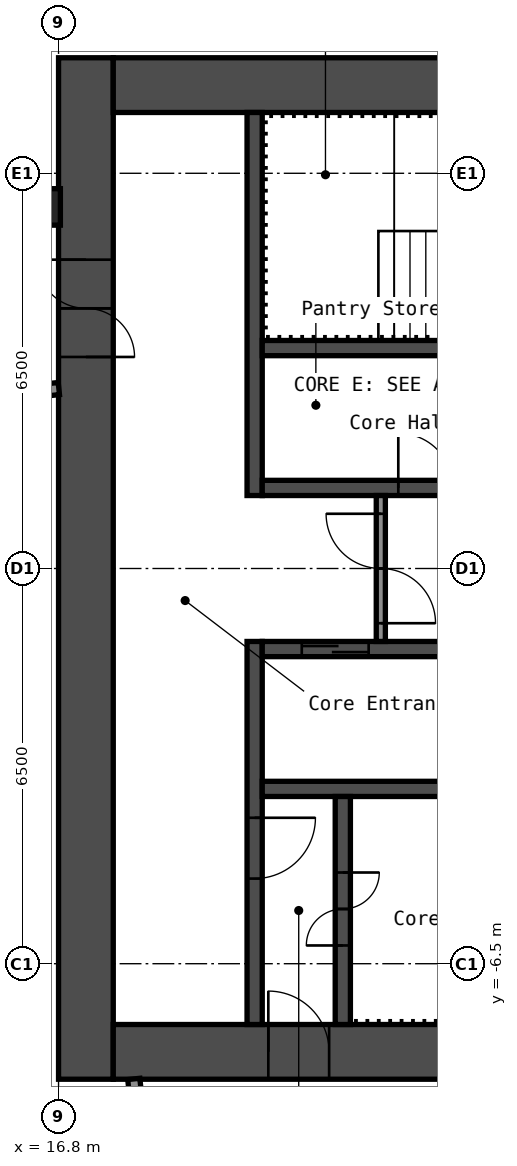
"""IFC4 building model, lengths in metres.
Left out: names, types, materials, properties, quantities, classifications, styles, units other than length and angle.
Written with IfcOpenShell. Run it as: python <this file> out.ifc"""

import sys

from ifc_helpers import new_model, si_unit, direction, frame, frame_2d, origin, origin_2d, place, context, subcontext, project, spatial, rectangle, hollow_rectangle, extrude, element, fill, save


model = new_model("IFC4")
c1 = context("Model", 3, precision=1e-05, world=origin(), true_north=direction((0.0, 1.0)))
c2 = subcontext(c1, "Body", "Model", "MODEL_VIEW")
j1 = project(units=[si_unit("LENGTHUNIT", "METRE"), si_unit("PLANEANGLEUNIT", "RADIAN")], contexts=[c1])
p1 = place(None, origin())
s1 = spatial("IfcSite", under=j1, at=p1, CompositionType="ELEMENT")
p2 = place(p1, origin())
s2 = spatial("IfcBuilding", under=s1, at=p2, CompositionType="ELEMENT")
p3 = place(p2, frame((0.0, 0.0, 261.4)))
s3 = spatial("IfcBuildingStorey", under=s2, at=p3, CompositionType="ELEMENT", Elevation=261.4)
p4 = place(p3, frame((16.53, 5.947, 0.0), z_axis=(0.0, 0.0, 1.0), x_axis=(1.0, 0.0, 0.0)))
e1 = element("IfcColumn", 1, at=p4, inside=s3, PredefinedType="COLUMN", context=c2, shape_type="SweptSolid", body=[
    extrude(hollow_rectangle(XDim=0.6, YDim=0.6, WallThickness=0.025, InnerFilletRadius=0.038, OuterFilletRadius=0.062, at=origin_2d()), origin(), (0.0, 0.0, 1.0), 2.75),
])
p5 = place(p3, frame((17.25, -8.4, 0.0), z_axis=(0.0, 0.0, 1.0), x_axis=(0.0, 1.0, 0.0)))
e2 = element("IfcWall", 2, at=p5, inside=s3, PredefinedType="SHEAR", context=c2, shape_type="SweptSolid", body=[
    extrude(rectangle(XDim=16.8, YDim=0.9, at=frame_2d((8.4, 0.0))), origin(), (0.0, 0.0, 1.0), 2.75),
])
p6 = place(p5, frame((11.879, 0.0, 0.0)))
e3 = element("IfcOpeningElement", 3, at=p6, cuts=e2, PredefinedType="OPENING", context=c2, shape_type="SweptSolid", body=[
    extrude(rectangle(XDim=1.6, YDim=2.1, at=frame_2d((0.8, 1.05))), frame((0.0, 0.46, 0.0), z_axis=(0.0, -1.0, 0.0), x_axis=(1.0, 0.0, 0.0)), (0.0, 0.0, 1.0), 0.92),
])
p7 = place(p3, frame((17.7, 7.95, 0.0), z_axis=(0.0, 0.0, 1.0), x_axis=(1.0, 0.0, 0.0)))
e4 = element("IfcWall", 4, at=p7, inside=s3, PredefinedType="SHEAR", context=c2, shape_type="SweptSolid", body=[
    extrude(rectangle(XDim=15.0, YDim=0.9, at=frame_2d((7.5, 0.0))), origin(), (0.0, 0.0, 1.0), 2.75),
])
p8 = place(p7, frame((10.4, 0.0, 0.0)))
e5 = element("IfcOpeningElement", 5, at=p8, cuts=e4, PredefinedType="OPENING", context=c2, shape_type="SweptSolid", body=[
    extrude(rectangle(XDim=1.2, YDim=2.1, at=frame_2d((0.6, 1.05))), frame((0.0, 0.46, 0.0), z_axis=(0.0, -1.0, 0.0), x_axis=(1.0, 0.0, 0.0)), (0.0, 0.0, 1.0), 0.92),
])
p9 = place(p7, frame((13.35, 0.0, 0.0)))
e6 = element("IfcOpeningElement", 6, at=p9, cuts=e4, PredefinedType="OPENING", context=c2, shape_type="SweptSolid", body=[
    extrude(rectangle(XDim=0.9, YDim=2.1, at=frame_2d((0.45, 1.05))), frame((0.0, 0.46, 0.0), z_axis=(0.0, -1.0, 0.0), x_axis=(1.0, 0.0, 0.0)), (0.0, 0.0, 1.0), 0.92),
])
p10 = place(p3, frame((17.7, -7.95, 0.0), z_axis=(0.0, 0.0, 1.0), x_axis=(1.0, 0.0, 0.0)))
e7 = element("IfcWall", 7, at=p10, inside=s3, PredefinedType="SHEAR", context=c2, shape_type="SweptSolid", body=[
    extrude(rectangle(XDim=15.0, YDim=0.9, at=frame_2d((7.5, 0.0))), origin(), (0.0, 0.0, 1.0), 2.75),
])
p11 = place(p10, frame((2.55, 0.0, 0.0)))
e8 = element("IfcOpeningElement", 8, at=p11, cuts=e7, PredefinedType="OPENING", context=c2, shape_type="SweptSolid", body=[
    extrude(rectangle(XDim=1.0, YDim=2.1, at=frame_2d((0.5, 1.05))), frame((0.0, 0.46, 0.0), z_axis=(0.0, -1.0, 0.0), x_axis=(1.0, 0.0, 0.0)), (0.0, 0.0, 1.0), 0.92),
])
p12 = place(p3, frame((20.025, 1.2, 0.0), z_axis=(0.0, 0.0, 1.0), x_axis=(0.0, 1.0, 0.0)))
e9 = element("IfcWall", 9, at=p12, inside=s3, PredefinedType="SHEAR", context=c2, shape_type="SweptSolid", body=[
    extrude(rectangle(XDim=6.3, YDim=0.25, at=frame_2d((3.15, 0.0))), origin(), (0.0, 0.0, 1.0), 2.75),
])
p13 = place(p3, frame((20.025, -7.5, 0.0), z_axis=(0.0, 0.0, 1.0), x_axis=(0.0, 1.0, 0.0)))
e10 = element("IfcWall", 10, at=p13, inside=s3, PredefinedType="SHEAR", context=c2, shape_type="SweptSolid", body=[
    extrude(rectangle(XDim=6.3, YDim=0.25, at=frame_2d((3.15, 0.0))), origin(), (0.0, 0.0, 1.0), 2.75),
])
p14 = place(p13, frame((2.4, 0.0, 0.0)))
e11 = element("IfcOpeningElement", 11, at=p14, cuts=e10, PredefinedType="OPENING", context=c2, shape_type="SweptSolid", body=[
    extrude(rectangle(XDim=1.0, YDim=2.1, at=frame_2d((0.5, 1.05))), frame((0.0, 0.135, 0.0), z_axis=(0.0, -1.0, 0.0), x_axis=(1.0, 0.0, 0.0)), (0.0, 0.0, 1.0), 0.27),
])
p15 = place(p3, frame((20.15, 1.325, 0.0), z_axis=(0.0, 0.0, 1.0), x_axis=(1.0, 0.0, 0.0)))
e12 = element("IfcWall", 12, at=p15, inside=s3, PredefinedType="SHEAR", context=c2, shape_type="SweptSolid", body=[
    extrude(rectangle(XDim=7.5, YDim=0.25, at=frame_2d((3.75, 0.0))), origin(), (0.0, 0.0, 1.0), 2.75),
])
p16 = place(p15, frame((2.238, 0.0, 0.0)))
e13 = element("IfcOpeningElement", 13, at=p16, cuts=e12, PredefinedType="OPENING", context=c2, shape_type="SweptSolid", body=[
    extrude(rectangle(XDim=0.9, YDim=2.1, at=frame_2d((0.45, 1.05))), frame((0.0, 0.135, 0.0), z_axis=(0.0, -1.0, 0.0), x_axis=(1.0, 0.0, 0.0)), (0.0, 0.0, 1.0), 0.27),
])
p17 = place(p15, frame((5.938, 0.0, 0.0)))
e14 = element("IfcOpeningElement", 14, at=p17, cuts=e12, PredefinedType="OPENING", context=c2, shape_type="SweptSolid", body=[
    extrude(rectangle(XDim=0.9, YDim=2.1, at=frame_2d((0.45, 1.05))), frame((0.0, 0.135, 0.0), z_axis=(0.0, -1.0, 0.0), x_axis=(1.0, 0.0, 0.0)), (0.0, 0.0, 1.0), 0.27),
])
p18 = place(p3, frame((20.15, 3.625, 0.0), z_axis=(0.0, 0.0, 1.0), x_axis=(1.0, 0.0, 0.0)))
e15 = element("IfcWall", 15, at=p18, inside=s3, PredefinedType="SHEAR", context=c2, shape_type="SweptSolid", body=[
    extrude(rectangle(XDim=7.5, YDim=0.25, at=frame_2d((3.75, 0.0))), origin(), (0.0, 0.0, 1.0), 2.75),
])
p19 = place(p3, frame((20.15, -1.325, 0.0), z_axis=(0.0, 0.0, 1.0), x_axis=(1.0, 0.0, 0.0)))
e16 = element("IfcWall", 16, at=p19, inside=s3, PredefinedType="SHEAR", context=c2, shape_type="SweptSolid", body=[
    extrude(rectangle(XDim=7.5, YDim=0.25, at=frame_2d((3.75, 0.0))), origin(), (0.0, 0.0, 1.0), 2.75),
])
p20 = place(p19, frame((0.65, 0.0, 0.0)))
e17 = element("IfcOpeningElement", 17, at=p20, cuts=e16, PredefinedType="OPENING", context=c2, shape_type="SweptSolid", body=[
    extrude(rectangle(XDim=1.1, YDim=2.1, at=frame_2d((0.55, 1.05))), frame((0.0, 0.135, 0.0), z_axis=(0.0, -1.0, 0.0), x_axis=(1.0, 0.0, 0.0)), (0.0, 0.0, 1.0), 0.27),
])
p21 = place(p19, frame((3.05, 0.0, 0.0)))
e18 = element("IfcOpeningElement", 18, at=p21, cuts=e16, PredefinedType="OPENING", context=c2, shape_type="SweptSolid", body=[
    extrude(rectangle(XDim=1.1, YDim=2.1, at=frame_2d((0.55, 1.05))), frame((0.0, 0.135, 0.0), z_axis=(0.0, -1.0, 0.0), x_axis=(1.0, 0.0, 0.0)), (0.0, 0.0, 1.0), 0.27),
])
p22 = place(p19, frame((5.45, 0.0, 0.0)))
e19 = element("IfcOpeningElement", 19, at=p22, cuts=e16, PredefinedType="OPENING", context=c2, shape_type="SweptSolid", body=[
    extrude(rectangle(XDim=1.1, YDim=2.1, at=frame_2d((0.55, 1.05))), frame((0.0, 0.135, 0.0), z_axis=(0.0, -1.0, 0.0), x_axis=(1.0, 0.0, 0.0)), (0.0, 0.0, 1.0), 0.27),
])
p23 = place(p3, frame((20.15, -3.625, 0.0), z_axis=(0.0, 0.0, 1.0), x_axis=(1.0, 0.0, 0.0)))
e20 = element("IfcWall", 20, at=p23, inside=s3, PredefinedType="SHEAR", context=c2, shape_type="SweptSolid", body=[
    extrude(rectangle(XDim=7.5, YDim=0.25, at=frame_2d((3.75, 0.0))), origin(), (0.0, 0.0, 1.0), 2.75),
])
p24 = place(p3, frame((21.475, -7.5, 0.0), z_axis=(0.0, 0.0, 1.0), x_axis=(0.0, 1.0, 0.0)))
e21 = element("IfcWall", 21, at=p24, inside=s3, PredefinedType="SHEAR", context=c2, shape_type="SweptSolid", body=[
    extrude(rectangle(XDim=3.75, YDim=0.25, at=frame_2d((1.875, 0.0))), origin(), (0.0, 0.0, 1.0), 2.75),
])
p25 = place(p24, frame((1.3, 0.0, 0.0)))
e22 = element("IfcOpeningElement", 22, at=p25, cuts=e21, PredefinedType="OPENING", context=c2, shape_type="SweptSolid", body=[
    extrude(rectangle(XDim=1.2, YDim=2.1, at=frame_2d((0.6, 1.05))), frame((0.0, 0.135, 0.0), z_axis=(0.0, -1.0, 0.0), x_axis=(1.0, 0.0, 0.0)), (0.0, 0.0, 1.0), 0.27),
])
p26 = place(p3, frame((22.1, -1.2, 0.0), z_axis=(0.0, 0.0, 1.0), x_axis=(0.0, 1.0, 0.0)))
e23 = element("IfcWall", 23, at=p26, inside=s3, PredefinedType="PARTITIONING", context=c2, shape_type="SweptSolid", body=[
    extrude(rectangle(XDim=2.4, YDim=0.15, at=frame_2d((1.2, 0.0))), origin(), (0.0, 0.0, 1.0), 2.75),
])
p27 = place(p26, frame((0.3, 0.0, 0.0)))
e24 = element("IfcOpeningElement", 24, at=p27, cuts=e23, PredefinedType="OPENING", context=c2, shape_type="SweptSolid", body=[
    extrude(rectangle(XDim=1.8, YDim=2.1, at=frame_2d((0.9, 1.05))), frame((0.0, 0.085, 0.0), z_axis=(0.0, -1.0, 0.0), x_axis=(1.0, 0.0, 0.0)), (0.0, 0.0, 1.0), 0.17),
])
p28 = place(p3, frame((-16.572, -0.549, 0.0), z_axis=(0.0, 0.0, 1.0), x_axis=(0.994521146831, 0.104535584879, 0.0)))
e25 = element("IfcWall", 25, at=p28, inside=s3, PredefinedType="PARTITIONING", context=c2, shape_type="SweptSolid", body=[
    extrude(rectangle(XDim=33.561, YDim=0.2, at=frame_2d((16.78, 0.0))), origin(), (0.0, 0.0, 1.0), 2.75),
])
p29 = place(p28, frame((1.315, 0.0, 0.0)))
e26 = element("IfcOpeningElement", 26, at=p29, cuts=e25, PredefinedType="OPENING", context=c2, shape_type="SweptSolid", body=[
    extrude(rectangle(XDim=0.9, YDim=2.1, at=frame_2d((0.45, 1.05))), frame((0.0, 0.11, 0.0), z_axis=(0.0, -1.0, 0.0), x_axis=(1.0, 0.0, 0.0)), (0.0, 0.0, 1.0), 0.22),
])
p30 = place(p28, frame((5.515, 0.0, 0.0)))
e27 = element("IfcOpeningElement", 27, at=p30, cuts=e25, PredefinedType="OPENING", context=c2, shape_type="SweptSolid", body=[
    extrude(rectangle(XDim=0.9, YDim=2.1, at=frame_2d((0.45, 1.05))), frame((0.0, 0.11, 0.0), z_axis=(0.0, -1.0, 0.0), x_axis=(1.0, 0.0, 0.0)), (0.0, 0.0, 1.0), 0.22),
])
p31 = place(p28, frame((10.555, 0.0, 0.0)))
e28 = element("IfcOpeningElement", 28, at=p31, cuts=e25, PredefinedType="OPENING", context=c2, shape_type="SweptSolid", body=[
    extrude(rectangle(XDim=0.9, YDim=2.1, at=frame_2d((0.45, 1.05))), frame((0.0, 0.11, 0.0), z_axis=(0.0, -1.0, 0.0), x_axis=(1.0, 0.0, 0.0)), (0.0, 0.0, 1.0), 0.22),
])
p32 = place(p28, frame((14.755, 0.0, 0.0)))
e29 = element("IfcOpeningElement", 29, at=p32, cuts=e25, PredefinedType="OPENING", context=c2, shape_type="SweptSolid", body=[
    extrude(rectangle(XDim=0.9, YDim=2.1, at=frame_2d((0.45, 1.05))), frame((0.0, 0.11, 0.0), z_axis=(0.0, -1.0, 0.0), x_axis=(1.0, 0.0, 0.0)), (0.0, 0.0, 1.0), 0.22),
])
p33 = place(p28, frame((19.65, 0.0, 0.0)))
e30 = element("IfcOpeningElement", 30, at=p33, cuts=e25, PredefinedType="OPENING", context=c2, shape_type="SweptSolid", body=[
    extrude(rectangle(XDim=1.0, YDim=2.1, at=frame_2d((0.5, 1.05))), frame((0.0, 0.11, 0.0), z_axis=(0.0, -1.0, 0.0), x_axis=(1.0, 0.0, 0.0)), (0.0, 0.0, 1.0), 0.22),
])
p34 = place(p28, frame((21.35, 0.0, 0.0)))
e31 = element("IfcOpeningElement", 31, at=p34, cuts=e25, PredefinedType="OPENING", context=c2, shape_type="SweptSolid", body=[
    extrude(rectangle(XDim=1.0, YDim=2.1, at=frame_2d((0.5, 1.05))), frame((0.0, 0.11, 0.0), z_axis=(0.0, -1.0, 0.0), x_axis=(1.0, 0.0, 0.0)), (0.0, 0.0, 1.0), 0.22),
])
p35 = place(p28, frame((27.185, 0.0, 0.0)))
e32 = element("IfcOpeningElement", 32, at=p35, cuts=e25, PredefinedType="OPENING", context=c2, shape_type="SweptSolid", body=[
    extrude(rectangle(XDim=0.9, YDim=2.1, at=frame_2d((0.45, 1.05))), frame((0.0, 0.11, 0.0), z_axis=(0.0, -1.0, 0.0), x_axis=(1.0, 0.0, 0.0)), (0.0, 0.0, 1.0), 0.22),
])
p36 = place(p28, frame((31.385, 0.0, 0.0)))
e33 = element("IfcOpeningElement", 33, at=p36, cuts=e25, PredefinedType="OPENING", context=c2, shape_type="SweptSolid", body=[
    extrude(rectangle(XDim=0.9, YDim=2.1, at=frame_2d((0.45, 1.05))), frame((0.0, 0.11, 0.0), z_axis=(0.0, -1.0, 0.0), x_axis=(1.0, 0.0, 0.0)), (0.0, 0.0, 1.0), 0.22),
])
p37 = place(p3, frame((18.516, -12.949, 0.0), z_axis=(0.0, 0.0, 1.0), x_axis=(-0.104548796268, 0.994519758074, 0.0)))
e34 = element("IfcWall", 34, at=p37, inside=s3, PredefinedType="PARTITIONING", context=c2, shape_type="SweptSolid", body=[
    extrude(rectangle(XDim=4.579, YDim=0.2, at=frame_2d((2.29, 0.0))), origin(), (0.0, 0.0, 1.0), 2.75),
])
p38 = place(p6, origin())
e35 = element("IfcDoor", 35, at=p38, inside=s3, OperationType="DOUBLE_DOOR_SINGLE_SWING", PredefinedType="DOOR", context=c2, shape_type="SweptSolid", body=[
    extrude(rectangle(XDim=1.6, YDim=2.1, at=frame_2d((0.8, 1.05))), frame((0.0, 0.025, 0.0), z_axis=(0.0, -1.0, 0.0), x_axis=(1.0, 0.0, 0.0)), (0.0, 0.0, 1.0), 0.05),
])
fill(e3, e35)
p39 = place(p11, origin())
e36 = element("IfcDoor", 36, at=p39, inside=s3, OperationType="SINGLE_SWING_RIGHT", PredefinedType="DOOR", context=c2, shape_type="SweptSolid", body=[
    extrude(rectangle(XDim=1.0, YDim=2.1, at=frame_2d((0.5, 1.05))), frame((0.0, 0.025, 0.0), z_axis=(0.0, -1.0, 0.0), x_axis=(1.0, 0.0, 0.0)), (0.0, 0.0, 1.0), 0.05),
])
fill(e8, e36)
p40 = place(p25, origin())
e37 = element("IfcDoor", 37, at=p40, inside=s3, OperationType="DOUBLE_DOOR_SINGLE_SWING", PredefinedType="DOOR", context=c2, shape_type="SweptSolid", body=[
    extrude(rectangle(XDim=1.2, YDim=2.1, at=frame_2d((0.6, 1.05))), frame((0.0, 0.025, 0.0), z_axis=(0.0, -1.0, 0.0), x_axis=(1.0, 0.0, 0.0)), (0.0, 0.0, 1.0), 0.05),
])
fill(e22, e37)
p41 = place(p14, origin())
e38 = element("IfcDoor", 38, at=p41, inside=s3, OperationType="SINGLE_SWING_RIGHT", PredefinedType="DOOR", context=c2, shape_type="SweptSolid", body=[
    extrude(rectangle(XDim=1.0, YDim=2.1, at=frame_2d((0.5, 1.05))), frame((0.0, 0.025, 0.0), z_axis=(0.0, -1.0, 0.0), x_axis=(1.0, 0.0, 0.0)), (0.0, 0.0, 1.0), 0.05),
])
fill(e11, e38)
p42 = place(p27, origin())
e39 = element("IfcDoor", 39, at=p42, inside=s3, OperationType="DOUBLE_DOOR_SINGLE_SWING", PredefinedType="DOOR", context=c2, shape_type="SweptSolid", body=[
    extrude(rectangle(XDim=1.8, YDim=2.1, at=frame_2d((0.9, 1.05))), frame((0.0, 0.025, 0.0), z_axis=(0.0, -1.0, 0.0), x_axis=(1.0, 0.0, 0.0)), (0.0, 0.0, 1.0), 0.05),
])
fill(e24, e39)
p43 = place(p16, origin())
e40 = element("IfcDoor", 40, at=p43, inside=s3, OperationType="SINGLE_SWING_RIGHT", PredefinedType="DOOR", context=c2, shape_type="SweptSolid", body=[
    extrude(rectangle(XDim=0.9, YDim=2.1, at=frame_2d((0.45, 1.05))), frame((0.0, 0.025, 0.0), z_axis=(0.0, -1.0, 0.0), x_axis=(1.0, 0.0, 0.0)), (0.0, 0.0, 1.0), 0.05),
])
fill(e13, e40)
p44 = place(p20, origin())
e41 = element("IfcDoor", 41, at=p44, inside=s3, OperationType="DOUBLE_DOOR_SLIDING", PredefinedType="DOOR", context=c2, shape_type="SweptSolid", body=[
    extrude(rectangle(XDim=1.1, YDim=2.1, at=frame_2d((0.55, 1.05))), frame((0.0, 0.025, 0.0), z_axis=(0.0, -1.0, 0.0), x_axis=(1.0, 0.0, 0.0)), (0.0, 0.0, 1.0), 0.05),
])
fill(e17, e41)
save(model, sys.argv[1])
